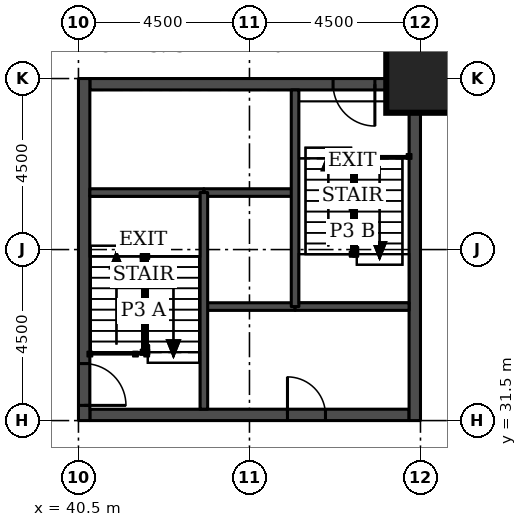
"""IFC4 building model, lengths in metres.
Left out: names, types, materials, properties, quantities, classifications, styles, units other than length and angle.
Written with IfcOpenShell. Run it as: python <this file> out.ifc"""

import sys

from ifc_helpers import new_model, si_unit, direction, frame, frame_2d, origin, origin_2d, place, context, subcontext, project, spatial, rectangle, extrude, element, fill, save


model = new_model("IFC4")
c1 = context("Model", 3, precision=1e-05, world=origin(), true_north=direction((0.0, 1.0)))
c2 = subcontext(c1, "Body", "Model", "MODEL_VIEW")
j1 = project(units=[si_unit("LENGTHUNIT", "METRE"), si_unit("PLANEANGLEUNIT", "RADIAN")], contexts=[c1])
p1 = place(None, origin())
s1 = spatial("IfcSite", under=j1, at=p1, CompositionType="ELEMENT")
p2 = place(p1, origin())
s2 = spatial("IfcBuilding", under=s1, at=p2, CompositionType="ELEMENT")
p3 = place(p2, frame((0.0, 0.0, 13.5)))
s3 = spatial("IfcBuildingStorey", under=s2, at=p3, CompositionType="ELEMENT", Elevation=13.5)
p4 = place(p3, frame((49.5, 40.5, 0.0), z_axis=(0.0, 0.0, 1.0), x_axis=(1.0, 0.0, 0.0)))
e1 = element("IfcColumn", 1, at=p4, inside=s3, PredefinedType="COLUMN", context=c2, shape_type="SweptSolid", body=[
    extrude(rectangle(XDim=1.8, YDim=1.8, at=origin_2d()), origin(), (0.0, 0.0, 1.0), 5.0),
])
p5 = place(p3, frame((40.8, 31.65, 0.0), z_axis=(0.0, 0.0, 1.0), x_axis=(1.0, 0.0, 0.0)))
e2 = element("IfcWall", 2, at=p5, inside=s3, PredefinedType="SHEAR", context=c2, shape_type="SweptSolid", body=[
    extrude(rectangle(XDim=8.4, YDim=0.3, at=frame_2d((4.2, 0.0))), origin(), (0.0, 0.0, 1.0), 5.0),
])
p6 = place(p5, frame((5.2, 0.0, 0.0)))
e3 = element("IfcOpeningElement", 3, at=p6, cuts=e2, PredefinedType="OPENING", context=c2, shape_type="SweptSolid", body=[
    extrude(rectangle(XDim=1.0, YDim=2.1, at=frame_2d((0.5, 1.05))), frame((0.0, 0.16, 0.0), z_axis=(0.0, -1.0, 0.0), x_axis=(1.0, 0.0, 0.0)), (0.0, 0.0, 1.0), 0.32),
])
p7 = place(p3, frame((40.8, 40.35, 0.0), z_axis=(0.0, 0.0, 1.0), x_axis=(1.0, 0.0, 0.0)))
e4 = element("IfcWall", 4, at=p7, inside=s3, PredefinedType="SHEAR", context=c2, shape_type="SweptSolid", body=[
    extrude(rectangle(XDim=8.4, YDim=0.3, at=frame_2d((4.2, 0.0))), origin(), (0.0, 0.0, 1.0), 5.0),
])
p8 = place(p7, frame((6.4, 0.0, 0.0)))
e5 = element("IfcOpeningElement", 5, at=p8, cuts=e4, PredefinedType="OPENING", context=c2, shape_type="SweptSolid", body=[
    extrude(rectangle(XDim=1.1, YDim=2.1, at=frame_2d((0.55, 1.05))), frame((0.0, 0.16, 0.0), z_axis=(0.0, -1.0, 0.0), x_axis=(1.0, 0.0, 0.0)), (0.0, 0.0, 1.0), 0.32),
])
p9 = place(p3, frame((40.65, 31.5, 0.0), z_axis=(0.0, 0.0, 1.0), x_axis=(0.0, 1.0, 0.0)))
e6 = element("IfcWall", 6, at=p9, inside=s3, PredefinedType="SHEAR", context=c2, shape_type="SweptSolid", body=[
    extrude(rectangle(XDim=9.0, YDim=0.3, at=frame_2d((4.5, 0.0))), origin(), (0.0, 0.0, 1.0), 5.0),
])
p10 = place(p9, frame((0.4, 0.0, 0.0)))
e7 = element("IfcOpeningElement", 7, at=p10, cuts=e6, PredefinedType="OPENING", context=c2, shape_type="SweptSolid", body=[
    extrude(rectangle(XDim=1.1, YDim=2.1, at=frame_2d((0.55, 1.05))), frame((0.0, 0.16, 0.0), z_axis=(0.0, -1.0, 0.0), x_axis=(1.0, 0.0, 0.0)), (0.0, 0.0, 1.0), 0.32),
])
p11 = place(p3, frame((49.35, 31.5, 0.0), z_axis=(0.0, 0.0, 1.0), x_axis=(0.0, 1.0, 0.0)))
e8 = element("IfcWall", 8, at=p11, inside=s3, PredefinedType="SHEAR", context=c2, shape_type="SweptSolid", body=[
    extrude(rectangle(XDim=9.0, YDim=0.3, at=frame_2d((4.5, 0.0))), origin(), (0.0, 0.0, 1.0), 5.0),
])
p12 = place(p3, frame((43.8, 34.5, 0.0), z_axis=(0.0, 0.0, 1.0), x_axis=(1.0, 0.0, 0.0)))
e9 = element("IfcWall", 9, at=p12, inside=s3, PredefinedType="SOLIDWALL", context=c2, shape_type="SweptSolid", body=[
    extrude(rectangle(XDim=2.4, YDim=0.2, at=frame_2d((1.2, 0.0))), origin(), (0.0, 0.0, 1.0), 4.78),
])
p13 = place(p3, frame((46.2, 34.5, 0.0), z_axis=(0.0, 0.0, 1.0), x_axis=(1.0, 0.0, 0.0)))
e10 = element("IfcWall", 10, at=p13, inside=s3, PredefinedType="SOLIDWALL", context=c2, shape_type="SweptSolid", body=[
    extrude(rectangle(XDim=3.0, YDim=0.2, at=frame_2d((1.5, 0.0))), origin(), (0.0, 0.0, 1.0), 4.78),
])
p14 = place(p3, frame((43.8, 37.5, 0.0), z_axis=(0.0, 0.0, 1.0), x_axis=(1.0, 0.0, 0.0)))
e11 = element("IfcWall", 11, at=p14, inside=s3, PredefinedType="SOLIDWALL", context=c2, shape_type="SweptSolid", body=[
    extrude(rectangle(XDim=2.4, YDim=0.2, at=frame_2d((1.2, 0.0))), origin(), (0.0, 0.0, 1.0), 5.0),
])
p15 = place(p3, frame((40.8, 37.5, 0.0), z_axis=(0.0, 0.0, 1.0), x_axis=(1.0, 0.0, 0.0)))
e12 = element("IfcWall", 12, at=p15, inside=s3, PredefinedType="SOLIDWALL", context=c2, shape_type="SweptSolid", body=[
    extrude(rectangle(XDim=3.0, YDim=0.2, at=frame_2d((1.5, 0.0))), origin(), (0.0, 0.0, 1.0), 4.78),
])
for number, where, z_axis, x_axis in (
    (13, (43.8, 31.8, 0.0), (0.0, 0.0, 1.0), (0.0, 1.0, 0.0)),
    (14, (46.2, 34.5, 0.0), (0.0, 0.0, 1.0), (0.0, 1.0, 0.0)),
):
    element("IfcWall", number, at=place(p3, frame(where, z_axis=z_axis, x_axis=x_axis)), inside=s3, PredefinedType="SOLIDWALL", context=c2, shape_type="SweptSolid", body=[
        extrude(rectangle(XDim=5.7, YDim=0.2, at=frame_2d((2.85, 0.0))), origin(), (0.0, 0.0, 1.0), 4.78),
    ])
p16 = place(p10, frame((1.1, 0.0, 0.0), z_axis=(0.0, 0.0, 1.0), x_axis=(-1.0, 0.0, 0.0)))
e15 = element("IfcDoor", 15, at=p16, inside=s3, OperationType="SINGLE_SWING_RIGHT", PredefinedType="DOOR", context=c2, shape_type="SweptSolid", body=[
    extrude(rectangle(XDim=1.1, YDim=2.1, at=frame_2d((0.55, 1.05))), frame((0.0, 0.025, 0.0), z_axis=(0.0, -1.0, 0.0), x_axis=(1.0, 0.0, 0.0)), (0.0, 0.0, 1.0), 0.05),
])
fill(e7, e15)
p17 = place(p8, frame((1.1, 0.0, 0.0), z_axis=(0.0, 0.0, 1.0), x_axis=(-1.0, 0.0, 0.0)))
e16 = element("IfcDoor", 16, at=p17, inside=s3, OperationType="SINGLE_SWING_LEFT", PredefinedType="DOOR", context=c2, shape_type="SweptSolid", body=[
    extrude(rectangle(XDim=1.1, YDim=2.1, at=frame_2d((0.55, 1.05))), frame((0.0, 0.025, 0.0), z_axis=(0.0, -1.0, 0.0), x_axis=(1.0, 0.0, 0.0)), (0.0, 0.0, 1.0), 0.05),
])
fill(e5, e16)
p18 = place(p6, origin())
e17 = element("IfcDoor", 17, at=p18, inside=s3, OperationType="SINGLE_SWING_LEFT", PredefinedType="DOOR", context=c2, shape_type="SweptSolid", body=[
    extrude(rectangle(XDim=1.0, YDim=2.1, at=frame_2d((0.5, 1.05))), frame((0.0, 0.025, 0.0), z_axis=(0.0, -1.0, 0.0), x_axis=(1.0, 0.0, 0.0)), (0.0, 0.0, 1.0), 0.05),
])
fill(e3, e17)
save(model, sys.argv[1])
